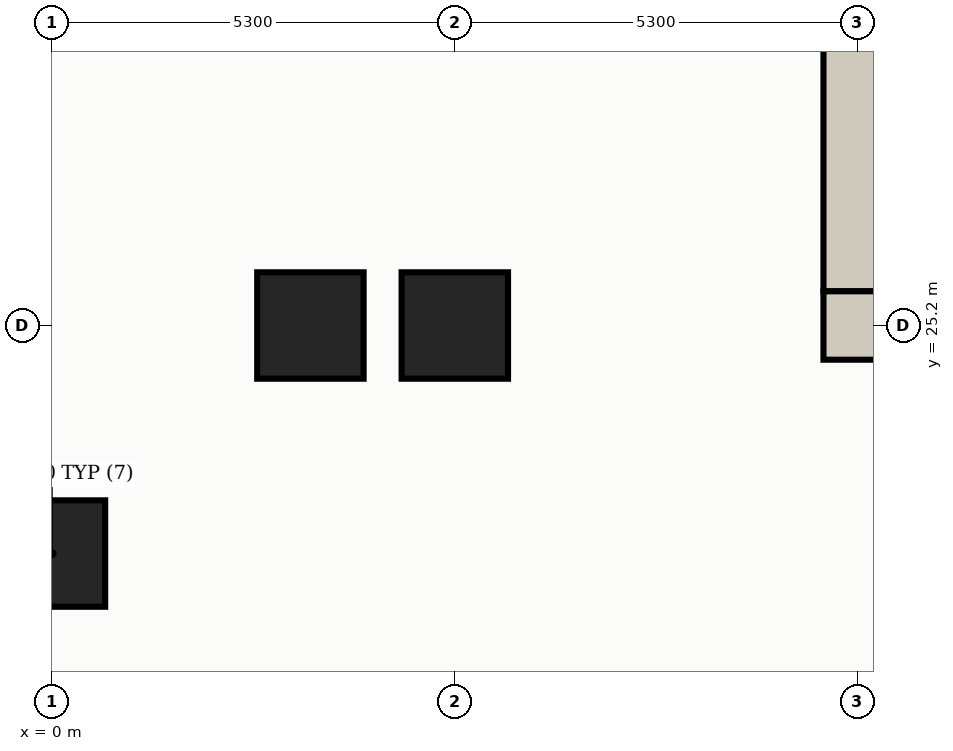
"""IFC4 building model, lengths in metres.
Left out: names, types, materials, properties, quantities, classifications, styles, units other than length and angle.
Written with IfcOpenShell. Run it as: python <this file> out.ifc"""

import sys

from ifc_helpers import new_model, si_unit, direction, frame, frame_2d, origin, origin_2d, place, context, subcontext, project, spatial, rectangle, hollow_rectangle, extrude, element, save


model = new_model("IFC4")
c1 = context("Model", 3, precision=1e-05, world=origin(), true_north=direction((0.0, 1.0)))
c2 = subcontext(c1, "Body", "Model", "MODEL_VIEW")
j1 = project(units=[si_unit("LENGTHUNIT", "METRE"), si_unit("PLANEANGLEUNIT", "RADIAN")], contexts=[c1])
p1 = place(None, origin())
s1 = spatial("IfcSite", under=j1, at=p1, CompositionType="ELEMENT")
p2 = place(p1, origin())
s2 = spatial("IfcBuilding", under=s1, at=p2, CompositionType="ELEMENT")
p3 = place(p2, frame((0.0, 0.0, -8.4)))
s3 = spatial("IfcBuildingStorey", under=s2, at=p3, CompositionType="ELEMENT", Elevation=-8.4)
p4 = place(p3, frame((10.6, 25.65, 0.0), z_axis=(0.0, 0.0, 1.0), x_axis=(0.0, 1.0, 0.0)))
e1 = element("IfcWall", 1, at=p4, inside=s3, PredefinedType="SHEAR", context=c2, shape_type="SweptSolid", body=[
    extrude(rectangle(XDim=13.9, YDim=0.9, at=frame_2d((6.95, 0.0))), origin(), (0.0, 0.0, 1.0), 3.92),
])
p5 = place(p3, frame((10.15, 25.2, 0.0), z_axis=(0.0, 0.0, 1.0), x_axis=(1.0, 0.0, 0.0)))
e2 = element("IfcWall", 2, at=p5, inside=s3, PredefinedType="SHEAR", context=c2, shape_type="SweptSolid", body=[
    extrude(rectangle(XDim=8.25, YDim=0.9, at=frame_2d((4.125, 0.0))), origin(), (0.0, 0.0, 1.0), 3.92),
])
for number, where, z_axis, x_axis in (
    (3, (3.4, 25.2, 0.0), (0.0, 0.0, 1.0), (1.0, 0.0, 0.0)),
    (4, (5.3, 25.2, 0.0), (0.0, 0.0, 1.0), (1.0, 0.0, 0.0)),
    (5, (0.0, 22.2, 0.0), (0.0, 0.0, 1.0), (1.0, 0.0, 0.0)),
):
    element("IfcColumn", number, at=place(p3, frame(where, z_axis=z_axis, x_axis=x_axis)), inside=s3, PredefinedType="COLUMN", context=c2, shape_type="SweptSolid", body=[
        extrude(hollow_rectangle(XDim=1.4, YDim=1.4, WallThickness=0.045, at=origin_2d()), origin(), (0.0, 0.0, 1.0), 4.2),
    ])
save(model, sys.argv[1])
